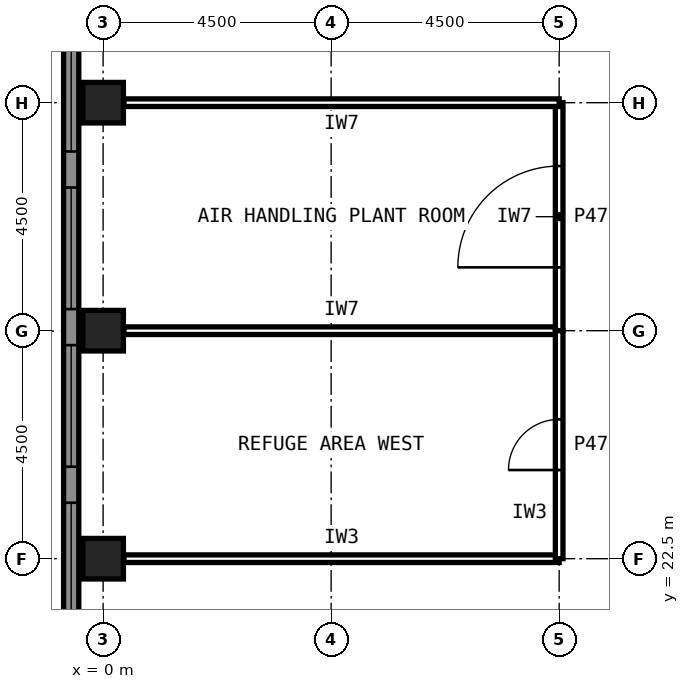
"""IFC4 building model, lengths in metres.
Left out: names, types, materials, properties, quantities, classifications, styles, units other than length and angle.
Written with IfcOpenShell. Run it as: python <this file> out.ifc"""

import sys

from ifc_helpers import new_model, si_unit, direction, frame, frame_2d, origin, origin_2d, place, context, subcontext, project, spatial, rectangle, hollow_rectangle, extrude, element, fill, save


model = new_model("IFC4")
c1 = context("Model", 3, precision=1e-05, world=origin(), true_north=direction((0.0, 1.0)))
c2 = subcontext(c1, "Body", "Model", "MODEL_VIEW")
j1 = project(units=[si_unit("LENGTHUNIT", "METRE"), si_unit("PLANEANGLEUNIT", "RADIAN")], contexts=[c1])
p1 = place(None, origin())
s1 = spatial("IfcSite", under=j1, at=p1, CompositionType="ELEMENT")
p2 = place(p1, origin())
s2 = spatial("IfcBuilding", under=s1, at=p2, CompositionType="ELEMENT")
p3 = place(p2, frame((0.0, 0.0, 199.6)))
s3 = spatial("IfcBuildingStorey", under=s2, at=p3, CompositionType="ELEMENT", Elevation=199.6)
for number, where, z_axis, x_axis in (
    (1, (0.0, 31.5, 0.0), (0.0, 0.0, 1.0), (1.0, 0.0, 0.0)),
    (2, (0.0, 27.0, 0.0), (0.0, 0.0, 1.0), (1.0, 0.0, 0.0)),
    (3, (0.0, 22.5, 0.0), (0.0, 0.0, 1.0), (1.0, 0.0, 0.0)),
):
    element("IfcColumn", number, at=place(p3, frame(where, z_axis=z_axis, x_axis=x_axis)), inside=s3, PredefinedType="COLUMN", context=c2, shape_type="SweptSolid", body=[
        extrude(hollow_rectangle(XDim=0.8, YDim=0.8, WallThickness=0.045, at=origin_2d()), origin(), (0.0, 0.0, 1.0), 6.0),
    ])
p4 = place(p3, frame((-0.63, 17.739, 0.0), z_axis=(0.0, 0.0, 1.0), x_axis=(0.0, 1.0, 0.0)))
e4 = element("IfcWall", 4, at=p4, inside=s3, PredefinedType="SOLIDWALL", context=c2, shape_type="SweptSolid", body=[
    extrude(rectangle(XDim=18.663, YDim=0.3, at=frame_2d((9.332, 0.0))), origin(), (0.0, 0.0, 1.0), 6.0),
])
p5 = place(p4, frame((0.355, 0.0, 1.2)))
e5 = element("IfcOpeningElement", 5, at=p5, cuts=e4, PredefinedType="OPENING", context=c2, shape_type="SweptSolid", body=[
    extrude(rectangle(XDim=2.4, YDim=3.0, at=frame_2d((1.2, 1.5))), frame((0.0, 0.16, 0.0), z_axis=(0.0, -1.0, 0.0), x_axis=(1.0, 0.0, 0.0)), (0.0, 0.0, 1.0), 0.32),
])
p6 = place(p4, frame((3.466, 0.0, 1.2)))
e6 = element("IfcOpeningElement", 6, at=p6, cuts=e4, PredefinedType="OPENING", context=c2, shape_type="SweptSolid", body=[
    extrude(rectangle(XDim=2.4, YDim=3.0, at=frame_2d((1.2, 1.5))), frame((0.0, 0.16, 0.0), z_axis=(0.0, -1.0, 0.0), x_axis=(1.0, 0.0, 0.0)), (0.0, 0.0, 1.0), 0.32),
])
p7 = place(p4, frame((6.576, 0.0, 1.2)))
e7 = element("IfcOpeningElement", 7, at=p7, cuts=e4, PredefinedType="OPENING", context=c2, shape_type="SweptSolid", body=[
    extrude(rectangle(XDim=2.4, YDim=3.0, at=frame_2d((1.2, 1.5))), frame((0.0, 0.16, 0.0), z_axis=(0.0, -1.0, 0.0), x_axis=(1.0, 0.0, 0.0)), (0.0, 0.0, 1.0), 0.32),
])
p8 = place(p4, frame((9.687, 0.0, 1.2)))
e8 = element("IfcOpeningElement", 8, at=p8, cuts=e4, PredefinedType="OPENING", context=c2, shape_type="SweptSolid", body=[
    extrude(rectangle(XDim=2.4, YDim=3.0, at=frame_2d((1.2, 1.5))), frame((0.0, 0.16, 0.0), z_axis=(0.0, -1.0, 0.0), x_axis=(1.0, 0.0, 0.0)), (0.0, 0.0, 1.0), 0.32),
])
p9 = place(p4, frame((12.798, 0.0, 1.2)))
e9 = element("IfcOpeningElement", 9, at=p9, cuts=e4, PredefinedType="OPENING", context=c2, shape_type="SweptSolid", body=[
    extrude(rectangle(XDim=2.4, YDim=3.0, at=frame_2d((1.2, 1.5))), frame((0.0, 0.16, 0.0), z_axis=(0.0, -1.0, 0.0), x_axis=(1.0, 0.0, 0.0)), (0.0, 0.0, 1.0), 0.32),
])
p10 = place(p4, frame((15.908, 0.0, 1.2)))
e10 = element("IfcOpeningElement", 10, at=p10, cuts=e4, PredefinedType="OPENING", context=c2, shape_type="SweptSolid", body=[
    extrude(rectangle(XDim=2.4, YDim=3.0, at=frame_2d((1.2, 1.5))), frame((0.0, 0.16, 0.0), z_axis=(0.0, -1.0, 0.0), x_axis=(1.0, 0.0, 0.0)), (0.0, 0.0, 1.0), 0.32),
])
p11 = place(p3, frame((0.41, 27.0, 0.0), z_axis=(0.0, 0.0, 1.0), x_axis=(1.0, 0.0, 0.0)))
e11 = element("IfcWall", 11, at=p11, inside=s3, PredefinedType="PARTITIONING", context=c2, shape_type="SweptSolid", body=[
    extrude(rectangle(XDim=8.59, YDim=0.15, at=frame_2d((4.295, 0.0))), origin(), (0.0, 0.0, 1.0), 4.72),
])
p12 = place(p3, frame((9.0, 27.0, 0.0), z_axis=(0.0, 0.0, 1.0), x_axis=(0.0, 1.0, 0.0)))
e12 = element("IfcWall", 12, at=p12, inside=s3, PredefinedType="PARTITIONING", context=c2, shape_type="SweptSolid", body=[
    extrude(rectangle(XDim=4.5, YDim=0.15, at=frame_2d((2.25, 0.0))), origin(), (0.0, 0.0, 1.0), 5.82),
])
p13 = place(p12, frame((1.25, 0.0, 0.0)))
e13 = element("IfcOpeningElement", 13, at=p13, cuts=e12, PredefinedType="OPENING", context=c2, shape_type="SweptSolid", body=[
    extrude(rectangle(XDim=2.0, YDim=2.4, at=frame_2d((1.0, 1.2))), frame((0.0, 0.085, 0.0), z_axis=(0.0, -1.0, 0.0), x_axis=(1.0, 0.0, 0.0)), (0.0, 0.0, 1.0), 0.17),
])
for number, where, z_axis, x_axis in (
    (14, (9.0, 31.5, 0.0), (0.0, 0.0, 1.0), (-1.0, 0.0, 0.0)),
    (15, (0.41, 22.5, 0.0), (0.0, 0.0, 1.0), (1.0, 0.0, 0.0)),
):
    element("IfcWall", number, at=place(p3, frame(where, z_axis=z_axis, x_axis=x_axis)), inside=s3, PredefinedType="PARTITIONING", context=c2, shape_type="SweptSolid", body=[
        extrude(rectangle(XDim=8.59, YDim=0.15, at=frame_2d((4.295, 0.0))), origin(), (0.0, 0.0, 1.0), 4.72),
    ])
p14 = place(p3, frame((9.0, 22.5, 0.0), z_axis=(0.0, 0.0, 1.0), x_axis=(0.0, 1.0, 0.0)))
e16 = element("IfcWall", 16, at=p14, inside=s3, PredefinedType="PARTITIONING", context=c2, shape_type="SweptSolid", body=[
    extrude(rectangle(XDim=4.5, YDim=0.15, at=frame_2d((2.25, 0.0))), origin(), (0.0, 0.0, 1.0), 5.82),
])
p15 = place(p14, frame((1.75, 0.0, 0.0)))
e17 = element("IfcOpeningElement", 17, at=p15, cuts=e16, PredefinedType="OPENING", context=c2, shape_type="SweptSolid", body=[
    extrude(rectangle(XDim=1.0, YDim=2.1, at=frame_2d((0.5, 1.05))), frame((0.0, 0.085, 0.0), z_axis=(0.0, -1.0, 0.0), x_axis=(1.0, 0.0, 0.0)), (0.0, 0.0, 1.0), 0.17),
])
p16 = place(p6, origin())
e18 = element("IfcWindow", 18, at=p16, inside=s3, PartitioningType="SINGLE_PANEL", PredefinedType="USERDEFINED", context=c2, shape_type="SweptSolid", body=[
    extrude(rectangle(XDim=2.4, YDim=3.0, at=frame_2d((1.2, 1.5))), frame((0.0, 0.03, 0.0), z_axis=(0.0, -1.0, 0.0), x_axis=(1.0, 0.0, 0.0)), (0.0, 0.0, 1.0), 0.06),
])
fill(e6, e18)
p17 = place(p7, origin())
e19 = element("IfcWindow", 19, at=p17, inside=s3, PartitioningType="SINGLE_PANEL", PredefinedType="USERDEFINED", context=c2, shape_type="SweptSolid", body=[
    extrude(rectangle(XDim=2.4, YDim=3.0, at=frame_2d((1.2, 1.5))), frame((0.0, 0.03, 0.0), z_axis=(0.0, -1.0, 0.0), x_axis=(1.0, 0.0, 0.0)), (0.0, 0.0, 1.0), 0.06),
])
fill(e7, e19)
p18 = place(p8, origin())
e20 = element("IfcWindow", 20, at=p18, inside=s3, PartitioningType="SINGLE_PANEL", PredefinedType="USERDEFINED", context=c2, shape_type="SweptSolid", body=[
    extrude(rectangle(XDim=2.4, YDim=3.0, at=frame_2d((1.2, 1.5))), frame((0.0, 0.03, 0.0), z_axis=(0.0, -1.0, 0.0), x_axis=(1.0, 0.0, 0.0)), (0.0, 0.0, 1.0), 0.06),
])
fill(e8, e20)
p19 = place(p9, origin())
e21 = element("IfcWindow", 21, at=p19, inside=s3, PartitioningType="SINGLE_PANEL", PredefinedType="USERDEFINED", context=c2, shape_type="SweptSolid", body=[
    extrude(rectangle(XDim=2.4, YDim=3.0, at=frame_2d((1.2, 1.5))), frame((0.0, 0.03, 0.0), z_axis=(0.0, -1.0, 0.0), x_axis=(1.0, 0.0, 0.0)), (0.0, 0.0, 1.0), 0.06),
])
fill(e9, e21)
p20 = place(p13, origin())
e22 = element("IfcDoor", 22, at=p20, inside=s3, OperationType="SINGLE_SWING_LEFT", PredefinedType="DOOR", context=c2, shape_type="SweptSolid", body=[
    extrude(rectangle(XDim=2.0, YDim=2.4, at=frame_2d((1.0, 1.2))), frame((0.0, 0.025, 0.0), z_axis=(0.0, -1.0, 0.0), x_axis=(1.0, 0.0, 0.0)), (0.0, 0.0, 1.0), 0.05),
])
fill(e13, e22)
p21 = place(p15, origin())
e23 = element("IfcDoor", 23, at=p21, inside=s3, OperationType="SINGLE_SWING_LEFT", PredefinedType="DOOR", context=c2, shape_type="SweptSolid", body=[
    extrude(rectangle(XDim=1.0, YDim=2.1, at=frame_2d((0.5, 1.05))), frame((0.0, 0.025, 0.0), z_axis=(0.0, -1.0, 0.0), x_axis=(1.0, 0.0, 0.0)), (0.0, 0.0, 1.0), 0.05),
])
fill(e17, e23)
save(model, sys.argv[1])
